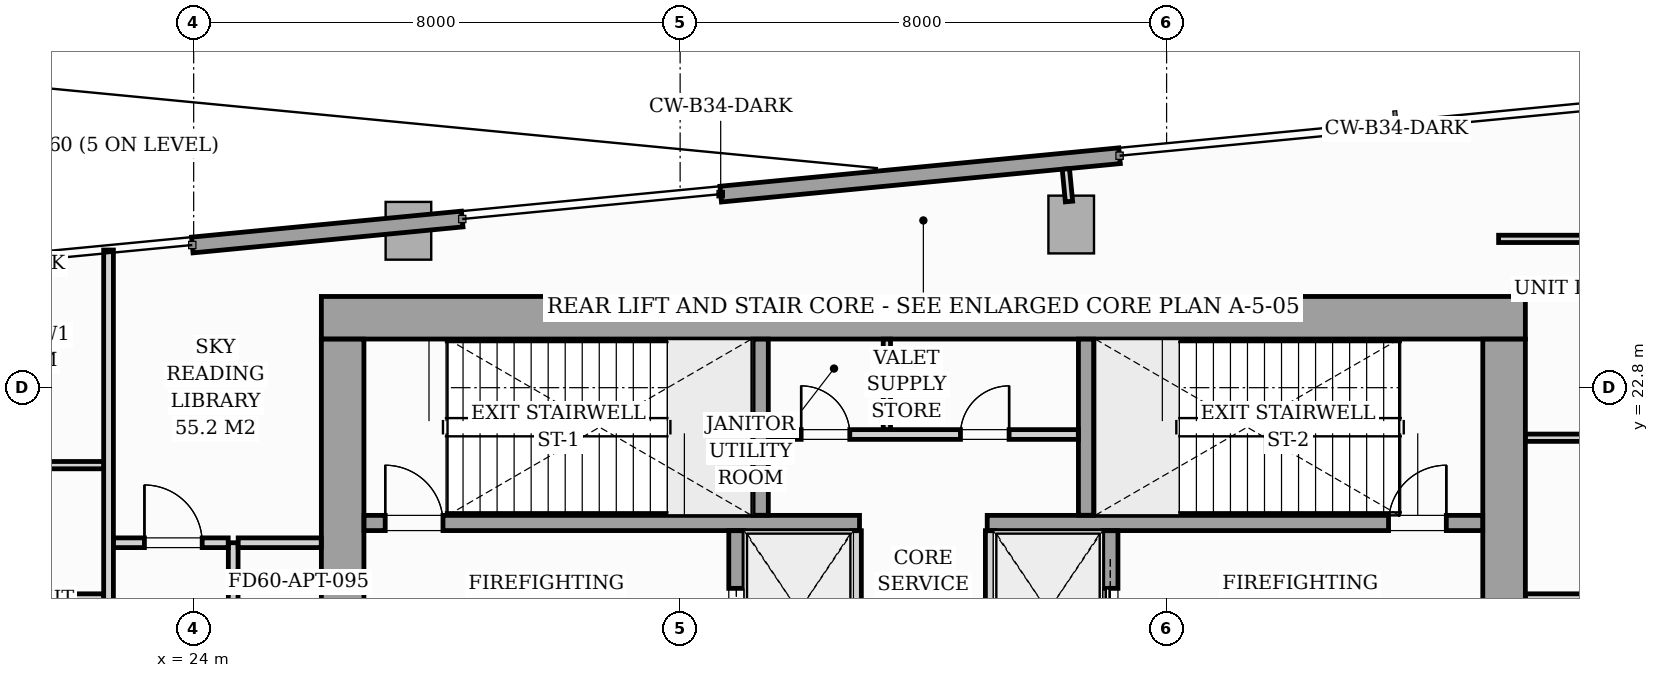
"""IFC4 building model, lengths in metres.
Left out: names, types, materials, properties, quantities, classifications, styles, units other than length and angle.
Written with IfcOpenShell. Run it as: python <this file> out.ifc"""

import sys

from ifc_helpers import new_model, si_unit, direction, frame, frame_2d, origin, origin_2d, place, context, subcontext, project, spatial, rectangle, i_section, extrude, source, transform, mapped, element, fill, save


model = new_model("IFC4")
c1 = context("Model", 3, precision=1e-05, world=origin(), true_north=direction((0.0, 1.0)))
c2 = subcontext(c1, "Body", "Model", "MODEL_VIEW")
j1 = project(units=[si_unit("LENGTHUNIT", "METRE"), si_unit("PLANEANGLEUNIT", "RADIAN")], contexts=[c1])
p1 = place(None, origin())
s1 = spatial("IfcSite", under=j1, at=p1, CompositionType="ELEMENT")
p2 = place(p1, origin())
s2 = spatial("IfcBuilding", under=s1, at=p2, CompositionType="ELEMENT")
p3 = place(p2, frame((0.0, 0.0, 167.8)))
s3 = spatial("IfcBuildingStorey", under=s2, at=p3, CompositionType="ELEMENT", Elevation=167.8)
m1 = source(origin(), c2, "Body", "SweptSolid", [
    extrude(i_section(OverallWidth=0.416, OverallDepth=0.446, WebThickness=0.039, FlangeThickness=0.063, FilletRadius=0.018, at=origin_2d()), origin(), (0.0, 0.0, 1.0), 5.196),
])
for number, where, z_axis, x_axis in (
    (1, (26.4, 24.0, 0.002), (0.0, 0.0, 1.0), (1.0, 0.0, 0.0)),
    (2, (33.12, 24.0, 0.002), (0.0, 0.0, 1.0), (1.0, 0.0, 0.0)),
    (3, (38.88, 24.0, 0.002), (0.0, 0.0, 1.0), (1.0, 0.0, 0.0)),
    (4, (45.6, 24.0, 0.002), (0.0, 0.0, 1.0), (1.0, 0.0, 0.0)),
):
    element("IfcColumn", number, at=place(p3, frame(where, z_axis=z_axis, x_axis=x_axis)), inside=s3, PredefinedType="PILASTER", context=c2, shape_type="MappedRepresentation", body=[
        mapped(m1, transform((0.0, 0.0, 0.0), scale=1.0)),
    ])
m2 = source(origin(), c2, "Body", "SweptSolid", [
    extrude(rectangle(XDim=0.75, YDim=0.95, at=origin_2d()), origin(), (0.0, 0.0, 1.0), 5.194),
])
for number, where, z_axis, x_axis in (
    (5, (27.532, 25.38, 0.004), (0.0, 0.0, 1.0), (0.995, 0.096, 0.0)),
    (6, (38.431, 25.483, 0.004), (0.0, 0.0, 1.0), (0.995, 0.096, 0.0)),
):
    element("IfcColumn", number, at=place(p3, frame(where, z_axis=z_axis, x_axis=x_axis)), inside=s3, PredefinedType="COLUMN", context=c2, shape_type="MappedRepresentation", body=[
        mapped(m2, transform((0.0, 0.0, 0.0), scale=1.0)),
    ])
p4 = place(p3, frame((23.977, 25.146, 0.0), z_axis=(0.0, 0.0, 1.0), x_axis=(0.99540100208, 0.095795850948, 0.0)))
e7 = element("IfcWall", 7, at=p4, inside=s3, PredefinedType="STANDARD", context=c2, shape_type="SweptSolid", body=[
    extrude(rectangle(XDim=4.46, YDim=0.26, at=frame_2d((2.23, 0.0))), origin(), (0.0, 0.0, 1.0), 4.94),
])
p5 = place(p3, frame((32.667, 25.983, 0.0), z_axis=(0.0, 0.0, 1.0), x_axis=(0.995396531125, 0.095842296636, 0.0)))
e8 = element("IfcWall", 8, at=p5, inside=s3, PredefinedType="STANDARD", context=c2, shape_type="SweptSolid", body=[
    extrude(rectangle(XDim=6.59, YDim=0.26, at=frame_2d((3.295, 0.0))), origin(), (0.0, 0.0, 1.0), 4.94),
])
p6 = place(p3, frame((26.1, 23.95, 0.0), z_axis=(0.0, 0.0, 1.0), x_axis=(1.0, 0.0, 0.0)))
e9 = element("IfcWall", 9, at=p6, inside=s3, PredefinedType="SHEAR", context=c2, shape_type="SweptSolid", body=[
    extrude(rectangle(XDim=19.8, YDim=0.7, at=frame_2d((9.9, 0.0))), origin(), (0.0, 0.0, 1.0), 5.2),
])
for number, where, z_axis, x_axis in (
    (10, (26.45, 17.802, 0.0), (0.0, 0.0, 1.0), (0.0, 1.0, 0.0)),
    (11, (45.55, 17.802, 0.0), (0.0, 0.0, 1.0), (0.0, 1.0, 0.0)),
):
    element("IfcWall", number, at=place(p3, frame(where, z_axis=z_axis, x_axis=x_axis)), inside=s3, PredefinedType="SHEAR", context=c2, shape_type="SweptSolid", body=[
        extrude(rectangle(XDim=5.796, YDim=0.7, at=frame_2d((2.898, 0.0))), origin(), (0.0, 0.0, 1.0), 5.2),
    ])
p7 = place(p3, frame((26.802, 20.575, 0.0), z_axis=(0.0, 0.0, 1.0), x_axis=(1.0, 0.0, 0.0)))
e12 = element("IfcWall", 12, at=p7, inside=s3, PredefinedType="SOLIDWALL", context=c2, shape_type="SweptSolid", body=[
    extrude(rectangle(XDim=8.148, YDim=0.25, at=frame_2d((4.074, 0.0))), origin(), (0.0, 0.0, 1.0), 5.2),
])
p8 = place(p7, frame((0.348, 0.0, 0.0)))
e13 = element("IfcOpeningElement", 13, at=p8, cuts=e12, PredefinedType="OPENING", context=c2, shape_type="SweptSolid", body=[
    extrude(rectangle(XDim=0.95, YDim=2.06, at=frame_2d((0.475, 1.03))), frame((0.0, 0.135, 0.0), z_axis=(0.0, -1.0, 0.0), x_axis=(1.0, 0.0, 0.0)), (0.0, 0.0, 1.0), 0.27),
])
p9 = place(p3, frame((37.05, 20.575, 0.0), z_axis=(0.0, 0.0, 1.0), x_axis=(1.0, 0.0, 0.0)))
e14 = element("IfcWall", 14, at=p9, inside=s3, PredefinedType="SOLIDWALL", context=c2, shape_type="SweptSolid", body=[
    extrude(rectangle(XDim=8.148, YDim=0.25, at=frame_2d((4.074, 0.0))), origin(), (0.0, 0.0, 1.0), 5.2),
])
p10 = place(p9, frame((6.6, 0.0, 0.0)))
e15 = element("IfcOpeningElement", 15, at=p10, cuts=e14, PredefinedType="OPENING", context=c2, shape_type="SweptSolid", body=[
    extrude(rectangle(XDim=0.95, YDim=2.06, at=frame_2d((0.475, 1.03))), frame((0.0, 0.135, 0.0), z_axis=(0.0, -1.0, 0.0), x_axis=(1.0, 0.0, 0.0)), (0.0, 0.0, 1.0), 0.27),
])
for number, where, z_axis, x_axis in (
    (16, (33.325, 20.702, 0.0), (0.0, 0.0, 1.0), (0.0, 1.0, 0.0)),
    (17, (38.675, 20.702, 0.0), (0.0, 0.0, 1.0), (0.0, 1.0, 0.0)),
):
    element("IfcWall", number, at=place(p3, frame(where, z_axis=z_axis, x_axis=x_axis)), inside=s3, PredefinedType="SOLIDWALL", context=c2, shape_type="SweptSolid", body=[
        extrude(rectangle(XDim=2.896, YDim=0.25, at=frame_2d((1.448, 0.0))), origin(), (0.0, 0.0, 1.0), 5.2),
    ])
p11 = place(p3, frame((32.925, 17.802, 0.0), z_axis=(0.0, 0.0, 1.0), x_axis=(0.0, 1.0, 0.0)))
e18 = element("IfcWall", 18, at=p11, inside=s3, PredefinedType="SOLIDWALL", context=c2, shape_type="SweptSolid", body=[
    extrude(rectangle(XDim=2.646, YDim=0.25, at=frame_2d((1.323, 0.0))), origin(), (0.0, 0.0, 1.0), 5.2),
])
p12 = place(p11, frame((0.598, 0.0, 0.0)))
e19 = element("IfcOpeningElement", 19, at=p12, cuts=e18, PredefinedType="OPENING", context=c2, shape_type="SweptSolid", body=[
    extrude(rectangle(XDim=1.1, YDim=2.08, at=frame_2d((0.55, 1.04))), frame((0.0, 0.135, 0.0), z_axis=(0.0, -1.0, 0.0), x_axis=(1.0, 0.0, 0.0)), (0.0, 0.0, 1.0), 0.27),
])
for number, where, z_axis, x_axis in (
    (20, (34.9, 17.802, 0.0), (0.0, 0.0, 1.0), (0.0, 1.0, 0.0)),
    (21, (37.1, 17.802, 0.0), (0.0, 0.0, 1.0), (0.0, 1.0, 0.0)),
):
    element("IfcWall", number, at=place(p3, frame(where, z_axis=z_axis, x_axis=x_axis)), inside=s3, PredefinedType="PARTITIONING", context=c2, shape_type="SweptSolid", body=[
        extrude(rectangle(XDim=2.646, YDim=0.16, at=frame_2d((1.323, 0.0))), origin(), (0.0, 0.0, 1.0), 4.94),
    ])
p13 = place(p3, frame((39.075, 17.802, 0.0), z_axis=(0.0, 0.0, 1.0), x_axis=(0.0, 1.0, 0.0)))
e22 = element("IfcWall", 22, at=p13, inside=s3, PredefinedType="SOLIDWALL", context=c2, shape_type="SweptSolid", body=[
    extrude(rectangle(XDim=2.646, YDim=0.25, at=frame_2d((1.323, 0.0))), origin(), (0.0, 0.0, 1.0), 5.2),
])
p14 = place(p13, frame((0.598, 0.0, 0.0)))
e23 = element("IfcOpeningElement", 23, at=p14, cuts=e22, PredefinedType="OPENING", context=c2, shape_type="SweptSolid", body=[
    extrude(rectangle(XDim=1.1, YDim=2.08, at=frame_2d((0.55, 1.04))), frame((0.0, 0.135, 0.0), z_axis=(0.0, -1.0, 0.0), x_axis=(1.0, 0.0, 0.0)), (0.0, 0.0, 1.0), 0.27),
])
p15 = place(p3, frame((33.452, 22.03, 0.0), z_axis=(0.0, 0.0, 1.0), x_axis=(1.0, 0.0, 0.0)))
e24 = element("IfcWall", 24, at=p15, inside=s3, PredefinedType="PARTITIONING", context=c2, shape_type="SweptSolid", body=[
    extrude(rectangle(XDim=5.096, YDim=0.16, at=frame_2d((2.548, 0.0))), origin(), (0.0, 0.0, 1.0), 4.94),
])
p16 = place(p15, frame((0.538, 0.0, 0.0)))
e25 = element("IfcOpeningElement", 25, at=p16, cuts=e24, PredefinedType="OPENING", context=c2, shape_type="SweptSolid", body=[
    extrude(rectangle(XDim=0.8, YDim=2.05, at=frame_2d((0.4, 1.025))), frame((0.0, 0.09, 0.0), z_axis=(0.0, -1.0, 0.0), x_axis=(1.0, 0.0, 0.0)), (0.0, 0.0, 1.0), 0.18),
])
p17 = place(p15, frame((3.158, 0.0, 0.0)))
e26 = element("IfcOpeningElement", 26, at=p17, cuts=e24, PredefinedType="OPENING", context=c2, shape_type="SweptSolid", body=[
    extrude(rectangle(XDim=0.8, YDim=2.05, at=frame_2d((0.4, 1.025))), frame((0.0, 0.09, 0.0), z_axis=(0.0, -1.0, 0.0), x_axis=(1.0, 0.0, 0.0)), (0.0, 0.0, 1.0), 0.18),
])
p18 = place(p3, frame((35.4, 22.112, 0.0), z_axis=(0.0, 0.0, 1.0), x_axis=(0.0, 1.0, 0.0)))
e27 = element("IfcWall", 27, at=p18, inside=s3, PredefinedType="PARTITIONING", context=c2, shape_type="SweptSolid", body=[
    extrude(rectangle(XDim=1.486, YDim=0.12, at=frame_2d((0.743, 0.0))), origin(), (0.0, 0.0, 1.0), 4.94),
])
p19 = place(p3, frame((22.6, 13.232, 0.0), z_axis=(0.0, 0.0, 1.0), x_axis=(0.0, 1.0, 0.0)))
e28 = element("IfcWall", 28, at=p19, inside=s3, PredefinedType="PARTITIONING", context=c2, shape_type="SweptSolid", body=[
    extrude(rectangle(XDim=11.832, YDim=0.16, at=frame_2d((5.916, 0.0))), origin(), (0.0, 0.0, 1.0), 4.94),
])
p20 = place(p19, frame((0.493, 0.0, 0.0)))
e29 = element("IfcOpeningElement", 29, at=p20, cuts=e28, PredefinedType="OPENING", context=c2, shape_type="SweptSolid", body=[
    extrude(rectangle(XDim=0.95, YDim=2.06, at=frame_2d((0.475, 1.03))), frame((0.0, 0.09, 0.0), z_axis=(0.0, -1.0, 0.0), x_axis=(1.0, 0.0, 0.0)), (0.0, 0.0, 1.0), 0.18),
])
p21 = place(p3, frame((20.262, 19.35, 0.0), z_axis=(0.0, 0.0, 1.0), x_axis=(1.0, 0.0, 0.0)))
e30 = element("IfcWall", 30, at=p21, inside=s3, PredefinedType="PARTITIONING", context=c2, shape_type="SweptSolid", body=[
    extrude(rectangle(XDim=2.256, YDim=0.12, at=frame_2d((1.128, 0.0))), origin(), (0.0, 0.0, 1.0), 4.94),
])
p22 = place(p3, frame((14.53, 21.526, 0.0), z_axis=(0.0, 0.0, 1.0), x_axis=(1.0, 0.0, 0.0)))
e31 = element("IfcWall", 31, at=p22, inside=s3, PredefinedType="PARTITIONING", context=c2, shape_type="SweptSolid", body=[
    extrude(rectangle(XDim=7.988, YDim=0.12, at=frame_2d((3.994, 0.0))), origin(), (0.0, 0.0, 1.0), 4.94),
])
p23 = place(p22, frame((2.925, 0.0, 0.0)))
e32 = element("IfcOpeningElement", 32, at=p23, cuts=e31, PredefinedType="OPENING", context=c2, shape_type="SweptSolid", body=[
    extrude(rectangle(XDim=0.85, YDim=2.05, at=frame_2d((0.425, 1.025))), frame((0.0, 0.07, 0.0), z_axis=(0.0, -1.0, 0.0), x_axis=(1.0, 0.0, 0.0)), (0.0, 0.0, 1.0), 0.14),
])
p24 = place(p3, frame((45.902, 19.35, 0.0), z_axis=(0.0, 0.0, 1.0), x_axis=(1.0, 0.0, 0.0)))
e33 = element("IfcWall", 33, at=p24, inside=s3, PredefinedType="PARTITIONING", context=c2, shape_type="SweptSolid", body=[
    extrude(rectangle(XDim=2.316, YDim=0.12, at=frame_2d((1.158, 0.0))), origin(), (0.0, 0.0, 1.0), 4.94),
])
p25 = place(p3, frame((45.46, 25.247, 0.0), z_axis=(0.0, 0.0, 1.0), x_axis=(1.0, 0.0, 0.0)))
e34 = element("IfcWall", 34, at=p25, inside=s3, PredefinedType="PARTITIONING", context=c2, shape_type="SweptSolid", body=[
    extrude(rectangle(XDim=9.461, YDim=0.12, at=frame_2d((4.73, 0.0))), origin(), (0.0, 0.0, 1.0), 4.94),
])
p26 = place(p25, frame((4.826, 0.0, 0.0)))
e35 = element("IfcOpeningElement", 35, at=p26, cuts=e34, PredefinedType="OPENING", context=c2, shape_type="SweptSolid", body=[
    extrude(rectangle(XDim=0.85, YDim=2.05, at=frame_2d((0.425, 1.025))), frame((0.0, 0.07, 0.0), z_axis=(0.0, -1.0, 0.0), x_axis=(1.0, 0.0, 0.0)), (0.0, 0.0, 1.0), 0.14),
])
p27 = place(p3, frame((45.902, 21.977, 0.0), z_axis=(0.0, 0.0, 1.0), x_axis=(1.0, 0.0, 0.0)))
e36 = element("IfcWall", 36, at=p27, inside=s3, PredefinedType="PARTITIONING", context=c2, shape_type="SweptSolid", body=[
    extrude(rectangle(XDim=18.404, YDim=0.12, at=frame_2d((9.202, 0.0))), origin(), (0.0, 0.0, 1.0), 4.94),
])
p28 = place(p27, frame((8.813, 0.0, 0.0)))
e37 = element("IfcOpeningElement", 37, at=p28, cuts=e36, PredefinedType="OPENING", context=c2, shape_type="SweptSolid", body=[
    extrude(rectangle(XDim=0.85, YDim=2.05, at=frame_2d((0.425, 1.025))), frame((0.0, 0.07, 0.0), z_axis=(0.0, -1.0, 0.0), x_axis=(1.0, 0.0, 0.0)), (0.0, 0.0, 1.0), 0.14),
])
p29 = place(p3, frame((24.65, 14.66, 0.0), z_axis=(0.0, 0.0, 1.0), x_axis=(0.0, 1.0, 0.0)))
e38 = element("IfcWall", 38, at=p29, inside=s3, PredefinedType="PARTITIONING", context=c2, shape_type="SweptSolid", body=[
    extrude(rectangle(XDim=5.59, YDim=0.16, at=frame_2d((2.795, 0.0))), origin(), (0.0, 0.0, 1.0), 4.94),
])
p30 = place(p29, frame((3.54, 0.0, 0.0)))
e39 = element("IfcOpeningElement", 39, at=p30, cuts=e38, PredefinedType="OPENING", context=c2, shape_type="SweptSolid", body=[
    extrude(rectangle(XDim=0.9, YDim=2.05, at=frame_2d((0.45, 1.025))), frame((0.0, 0.09, 0.0), z_axis=(0.0, -1.0, 0.0), x_axis=(1.0, 0.0, 0.0)), (0.0, 0.0, 1.0), 0.18),
])
p31 = place(p3, frame((22.682, 20.25, 0.0), z_axis=(0.0, 0.0, 1.0), x_axis=(1.0, 0.0, 0.0)))
e40 = element("IfcWall", 40, at=p31, inside=s3, PredefinedType="PARTITIONING", context=c2, shape_type="SweptSolid", body=[
    extrude(rectangle(XDim=1.886, YDim=0.16, at=frame_2d((0.943, 0.0))), origin(), (0.0, 0.0, 1.0), 4.94),
])
p32 = place(p31, frame((0.508, 0.0, 0.0)))
e41 = element("IfcOpeningElement", 41, at=p32, cuts=e40, PredefinedType="OPENING", context=c2, shape_type="SweptSolid", body=[
    extrude(rectangle(XDim=0.95, YDim=2.06, at=frame_2d((0.475, 1.03))), frame((0.0, 0.09, 0.0), z_axis=(0.0, -1.0, 0.0), x_axis=(1.0, 0.0, 0.0)), (0.0, 0.0, 1.0), 0.18),
])
p33 = place(p3, frame((24.732, 20.25, 0.0), z_axis=(0.0, 0.0, 1.0), x_axis=(1.0, 0.0, 0.0)))
e42 = element("IfcWall", 42, at=p33, inside=s3, PredefinedType="PARTITIONING", context=c2, shape_type="SweptSolid", body=[
    extrude(rectangle(XDim=1.366, YDim=0.16, at=frame_2d((0.683, 0.0))), origin(), (0.0, 0.0, 1.0), 4.94),
])
p34 = place(p3, frame((38.395, 25.861, 0.0), z_axis=(0.0, 0.0, 1.0), x_axis=(-0.096222656154, 0.995359834654, 0.0)))
e43 = element("IfcWall", 43, at=p34, inside=s3, PredefinedType="PARTITIONING", context=c2, shape_type="SweptSolid", body=[
    extrude(rectangle(XDim=0.538, YDim=0.12, at=frame_2d((0.269, 0.0))), origin(), (0.0, 0.0, 1.0), 4.94),
])
m3 = source(origin(), c2, "Body", "SweptSolid", [
    extrude(rectangle(XDim=0.95, YDim=2.06, at=frame_2d((0.475, 1.03))), frame((0.0, 0.025, 0.0), z_axis=(0.0, -1.0, 0.0), x_axis=(1.0, 0.0, 0.0)), (0.0, 0.0, 1.0), 0.05),
])
p35 = place(p8, origin())
e44 = element("IfcDoor", 44, at=p35, inside=s3, OperationType="SINGLE_SWING_LEFT", PredefinedType="DOOR", context=c2, shape_type="MappedRepresentation", body=[
    mapped(m3, transform((0.0, 0.0, 0.0), scale=1.0)),
])
fill(e13, e44)
p36 = place(p10, origin())
e45 = element("IfcDoor", 45, at=p36, inside=s3, OperationType="SINGLE_SWING_RIGHT", PredefinedType="DOOR", context=c2, shape_type="MappedRepresentation", body=[
    mapped(m3, transform((0.0, 0.0, 0.0), scale=1.0)),
])
fill(e15, e45)
m4 = source(origin(), c2, "Body", "SweptSolid", [
    extrude(rectangle(XDim=1.1, YDim=2.08, at=frame_2d((0.55, 1.04))), frame((0.0, 0.025, 0.0), z_axis=(0.0, -1.0, 0.0), x_axis=(1.0, 0.0, 0.0)), (0.0, 0.0, 1.0), 0.05),
])
p37 = place(p12, origin())
e46 = element("IfcDoor", 46, at=p37, inside=s3, OperationType="SLIDING_TO_LEFT", PredefinedType="DOOR", context=c2, shape_type="MappedRepresentation", body=[
    mapped(m4, transform((0.0, 0.0, 0.0), scale=1.0)),
])
fill(e19, e46)
p38 = place(p14, origin())
e47 = element("IfcDoor", 47, at=p38, inside=s3, OperationType="SLIDING_TO_RIGHT", PredefinedType="DOOR", context=c2, shape_type="MappedRepresentation", body=[
    mapped(m4, transform((0.0, 0.0, 0.0), scale=1.0)),
])
fill(e23, e47)
m5 = source(origin(), c2, "Body", "SweptSolid", [
    extrude(rectangle(XDim=0.8, YDim=2.05, at=frame_2d((0.4, 1.025))), frame((0.0, 0.025, 0.0), z_axis=(0.0, -1.0, 0.0), x_axis=(1.0, 0.0, 0.0)), (0.0, 0.0, 1.0), 0.05),
])
p39 = place(p16, origin())
e48 = element("IfcDoor", 48, at=p39, inside=s3, OperationType="SINGLE_SWING_LEFT", PredefinedType="DOOR", context=c2, shape_type="MappedRepresentation", body=[
    mapped(m5, transform((0.0, 0.0, 0.0), scale=1.0)),
])
fill(e25, e48)
p40 = place(p17, origin())
e49 = element("IfcDoor", 49, at=p40, inside=s3, OperationType="SINGLE_SWING_RIGHT", PredefinedType="DOOR", context=c2, shape_type="MappedRepresentation", body=[
    mapped(m5, transform((0.0, 0.0, 0.0), scale=1.0)),
])
fill(e26, e49)
m6 = source(origin(), c2, "Body", "SweptSolid", [
    extrude(rectangle(XDim=0.95, YDim=2.06, at=frame_2d((0.475, 1.03))), frame((0.0, 0.025, 0.0), z_axis=(0.0, -1.0, 0.0), x_axis=(1.0, 0.0, 0.0)), (0.0, 0.0, 1.0), 0.05),
])
p41 = place(p32, origin())
e50 = element("IfcDoor", 50, at=p41, inside=s3, OperationType="SINGLE_SWING_LEFT", PredefinedType="DOOR", context=c2, shape_type="MappedRepresentation", body=[
    mapped(m6, transform((0.0, 0.0, 0.0), scale=1.0)),
])
fill(e41, e50)
save(model, sys.argv[1])
